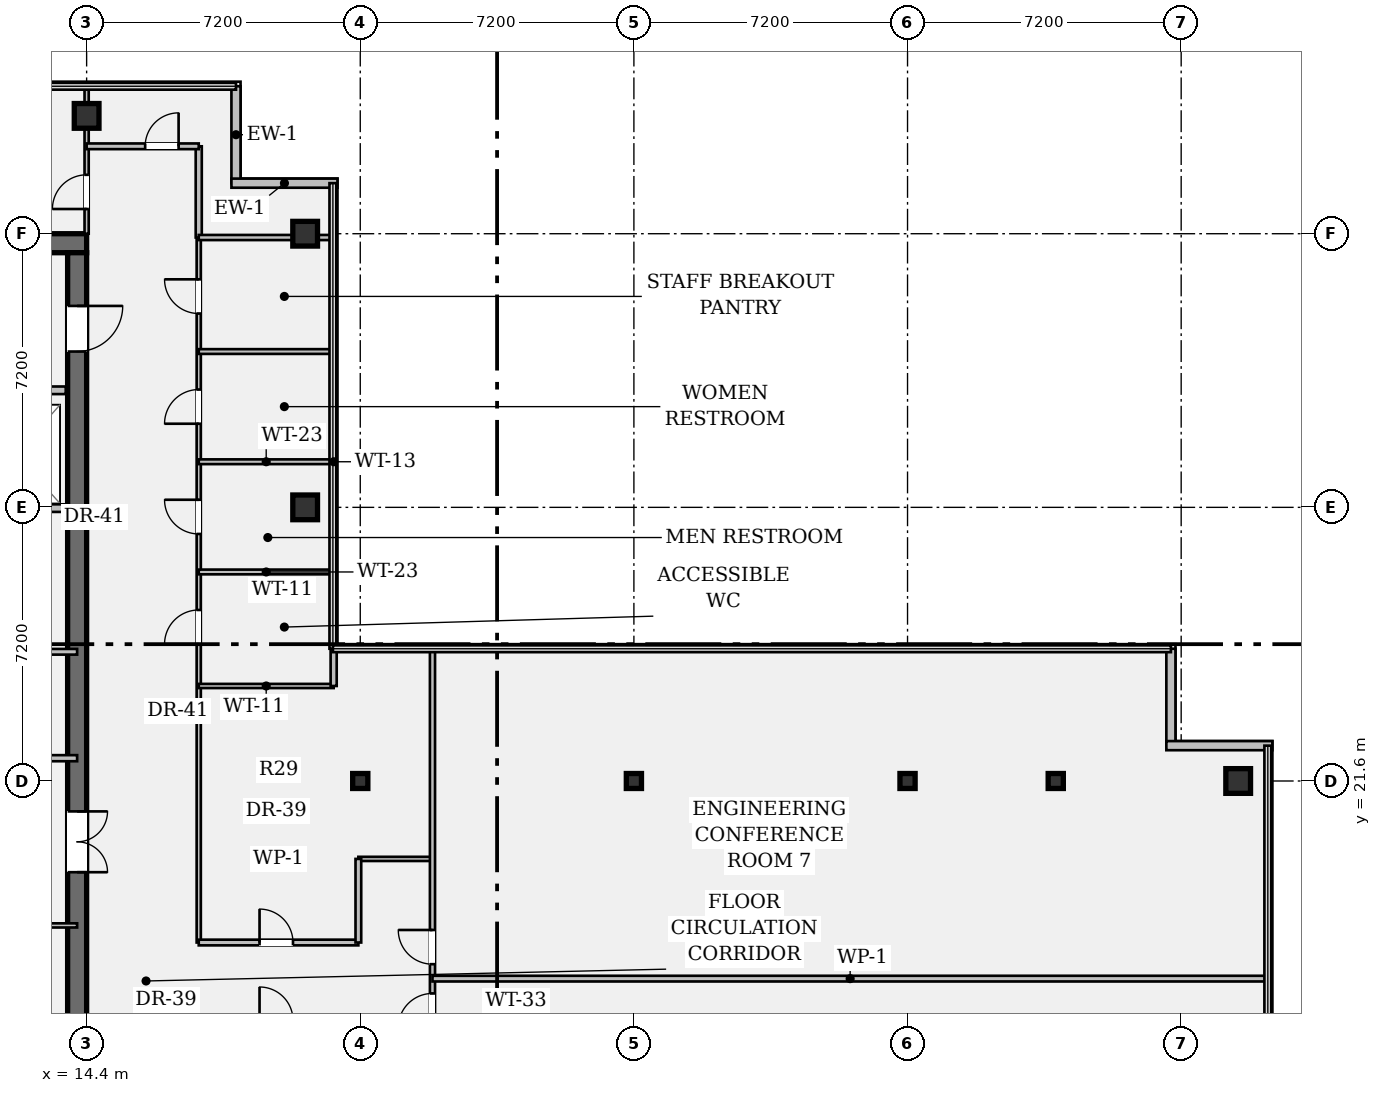
"""IFC4 building model, lengths in metres.
Left out: names, types, materials, properties, quantities, classifications, styles, units other than length and angle.
Written with IfcOpenShell. Run it as: python <this file> out.ifc"""

import sys

from ifc_helpers import new_model, si_unit, direction, frame, frame_2d, origin, origin_2d, place, context, subcontext, project, spatial, rectangle, hollow_rectangle, i_section, extrude, element, fill, save


model = new_model("IFC4")
c1 = context("Model", 3, precision=1e-05, world=origin(), true_north=direction((0.0, 1.0)))
c2 = subcontext(c1, "Body", "Model", "MODEL_VIEW")
j1 = project(units=[si_unit("LENGTHUNIT", "METRE"), si_unit("PLANEANGLEUNIT", "RADIAN")], contexts=[c1])
p1 = place(None, origin())
s1 = spatial("IfcSite", under=j1, at=p1, CompositionType="ELEMENT")
p2 = place(p1, origin())
s2 = spatial("IfcBuilding", under=s1, at=p2, CompositionType="ELEMENT")
p3 = place(p2, frame((0.0, 0.0, 255.15)))
s3 = spatial("IfcBuildingStorey", under=s2, at=p3, CompositionType="ELEMENT", Elevation=255.15)
p4 = place(p3, frame((0.5, 35.75, 0.0), z_axis=(0.0, 0.0, 1.0), x_axis=(1.0, 0.0, 0.0)))
e1 = element("IfcWall", 1, at=p4, inside=s3, PredefinedType="SHEAR", context=c2, shape_type="SweptSolid", body=[
    extrude(rectangle(XDim=13.9, YDim=0.5, at=frame_2d((6.95, 0.0))), origin(), (0.0, 0.0, 1.0), 3.24),
])
p5 = place(p3, frame((14.15, 35.5, 0.0), z_axis=(0.0, 0.0, 1.0), x_axis=(0.0, -1.0, 0.0)))
e2 = element("IfcWall", 2, at=p5, inside=s3, PredefinedType="SHEAR", context=c2, shape_type="SweptSolid", body=[
    extrude(rectangle(XDim=27.8, YDim=0.5, at=frame_2d((13.9, 0.0))), origin(), (0.0, 0.0, 1.0), 3.24),
])
p6 = place(p5, frame((1.4, 0.0, 0.0)))
e3 = element("IfcOpeningElement", 3, at=p6, cuts=e2, PredefinedType="OPENING", context=c2, shape_type="SweptSolid", body=[
    extrude(rectangle(XDim=1.2, YDim=2.15, at=frame_2d((0.6, 1.075))), frame((0.0, 0.262, 0.0), z_axis=(0.0, -1.0, 0.0), x_axis=(1.0, 0.0, 0.0)), (0.0, 0.0, 1.0), 0.524),
])
p7 = place(p5, frame((25.35, 0.0, 0.0)))
e4 = element("IfcOpeningElement", 4, at=p7, cuts=e2, PredefinedType="OPENING", context=c2, shape_type="SweptSolid", body=[
    extrude(rectangle(XDim=1.2, YDim=2.15, at=frame_2d((0.6, 1.075))), frame((0.0, 0.262, 0.0), z_axis=(0.0, -1.0, 0.0), x_axis=(1.0, 0.0, 0.0)), (0.0, 0.0, 1.0), 0.524),
])
p8 = place(p5, frame((14.7, 0.0, 0.0)))
e5 = element("IfcOpeningElement", 5, at=p8, cuts=e2, PredefinedType="OPENING", context=c2, shape_type="SweptSolid", body=[
    extrude(rectangle(XDim=1.6, YDim=2.2, at=frame_2d((0.8, 1.1))), frame((0.0, 0.262, 0.0), z_axis=(0.0, -1.0, 0.0), x_axis=(1.0, 0.0, 0.0)), (0.0, 0.0, 1.0), 0.524),
])
for number, where, z_axis, x_axis in (
    (6, (14.4, 39.1, 0.0), (0.0, 0.0, 1.0), (1.0, 0.0, 0.0)),
    (7, (20.15, 28.8, 0.0), (0.0, 0.0, 1.0), (1.0, 0.0, 0.0)),
    (8, (20.15, 36.0, 0.0), (0.0, 0.0, 1.0), (1.0, 0.0, 0.0)),
):
    element("IfcColumn", number, at=place(p3, frame(where, z_axis=z_axis, x_axis=x_axis)), inside=s3, PredefinedType="COLUMN", context=c2, shape_type="SweptSolid", body=[
        extrude(hollow_rectangle(XDim=0.65, YDim=0.65, WallThickness=0.04, at=origin_2d()), origin(), (0.0, 0.0, 1.0), 3.24),
    ])
for number, where, z_axis, x_axis in (
    (9, (21.6, 21.6, 0.0), (0.0, 0.0, 1.0), (1.0, 0.0, 0.0)),
    (10, (28.8, 21.6, 0.0), (0.0, 0.0, 1.0), (1.0, 0.0, 0.0)),
    (11, (36.0, 21.6, 0.0), (0.0, 0.0, 1.0), (1.0, 0.0, 0.0)),
    (12, (39.9, 21.6, 0.0), (0.0, 0.0, 1.0), (1.0, 0.0, 0.0)),
):
    element("IfcColumn", number, at=place(p3, frame(where, z_axis=z_axis, x_axis=x_axis)), inside=s3, PredefinedType="COLUMN", context=c2, shape_type="SweptSolid", body=[
        extrude(i_section(OverallWidth=0.399, OverallDepth=0.394, WebThickness=0.023, FlangeThickness=0.037, FilletRadius=0.018, at=origin_2d()), origin(), (0.0, 0.0, 1.0), 3.24),
    ])
p9 = place(p3, frame((44.7, 21.6, 0.0), z_axis=(0.0, 0.0, 1.0), x_axis=(1.0, 0.0, 0.0)))
e13 = element("IfcColumn", 13, at=p9, inside=s3, PredefinedType="COLUMN", context=c2, shape_type="SweptSolid", body=[
    extrude(hollow_rectangle(XDim=0.65, YDim=0.65, WallThickness=0.04, at=origin_2d()), origin(), (0.0, 0.0, 1.0), 3.24),
])
p10 = place(p3, frame((18.33, 39.88, 0.0), z_axis=(0.0, 0.0, 1.0), x_axis=(0.0, -1.0, 0.0)))
e14 = element("IfcWall", 14, at=p10, inside=s3, PredefinedType="STANDARD", context=c2, shape_type="SweptSolid", body=[
    extrude(rectangle(XDim=2.55, YDim=0.24, at=frame_2d((1.275, 0.0))), origin(), (0.0, 0.0, 1.0), 3.24),
])
p11 = place(p3, frame((18.21, 37.33, 0.0), z_axis=(0.0, 0.0, 1.0), x_axis=(1.0, 0.0, 0.0)))
e15 = element("IfcWall", 15, at=p11, inside=s3, PredefinedType="STANDARD", context=c2, shape_type="SweptSolid", body=[
    extrude(rectangle(XDim=2.79, YDim=0.24, at=frame_2d((1.395, 0.0))), origin(), (0.0, 0.0, 1.0), 3.24),
])
p12 = place(p3, frame((42.93, 25.08, 0.0), z_axis=(0.0, 0.0, 1.0), x_axis=(0.0, -1.0, 0.0)))
e16 = element("IfcWall", 16, at=p12, inside=s3, PredefinedType="STANDARD", context=c2, shape_type="SweptSolid", body=[
    extrude(rectangle(XDim=2.55, YDim=0.24, at=frame_2d((1.275, 0.0))), origin(), (0.0, 0.0, 1.0), 3.24),
])
p13 = place(p3, frame((42.81, 22.53, 0.0), z_axis=(0.0, 0.0, 1.0), x_axis=(1.0, 0.0, 0.0)))
e17 = element("IfcWall", 17, at=p13, inside=s3, PredefinedType="STANDARD", context=c2, shape_type="SweptSolid", body=[
    extrude(rectangle(XDim=2.79, YDim=0.24, at=frame_2d((1.395, 0.0))), origin(), (0.0, 0.0, 1.0), 3.24),
])
p14 = place(p3, frame((8.7, 31.88, 0.0), z_axis=(0.0, 0.0, 1.0), x_axis=(1.0, 0.0, 0.0)))
e18 = element("IfcWall", 18, at=p14, inside=s3, PredefinedType="PARTITIONING", context=c2, shape_type="SweptSolid", body=[
    extrude(rectangle(XDim=5.15, YDim=0.2, at=frame_2d((2.575, 0.0))), origin(), (0.0, 0.0, 1.0), 3.24),
])
p15 = place(p14, frame((0.75, 0.0, 0.0)))
e19 = element("IfcOpeningElement", 19, at=p15, cuts=e18, PredefinedType="OPENING", context=c2, shape_type="SweptSolid", body=[
    extrude(rectangle(XDim=1.2, YDim=2.2, at=frame_2d((0.6, 1.1))), frame((0.0, 0.112, 0.0), z_axis=(0.0, -1.0, 0.0), x_axis=(1.0, 0.0, 0.0)), (0.0, 0.0, 1.0), 0.224),
])
p16 = place(p14, frame((3.25, 0.0, 0.0)))
e20 = element("IfcOpeningElement", 20, at=p16, cuts=e18, PredefinedType="OPENING", context=c2, shape_type="SweptSolid", body=[
    extrude(rectangle(XDim=1.2, YDim=2.2, at=frame_2d((0.6, 1.1))), frame((0.0, 0.112, 0.0), z_axis=(0.0, -1.0, 0.0), x_axis=(1.0, 0.0, 0.0)), (0.0, 0.0, 1.0), 0.224),
])
p17 = place(p3, frame((8.7, 28.78, 0.0), z_axis=(0.0, 0.0, 1.0), x_axis=(1.0, 0.0, 0.0)))
e21 = element("IfcWall", 21, at=p17, inside=s3, PredefinedType="PARTITIONING", context=c2, shape_type="SweptSolid", body=[
    extrude(rectangle(XDim=5.15, YDim=0.2, at=frame_2d((2.575, 0.0))), origin(), (0.0, 0.0, 1.0), 3.24),
])
p18 = place(p3, frame((7.1, 22.2, 0.0), z_axis=(0.0, 0.0, 1.0), x_axis=(1.0, 0.0, 0.0)))
e22 = element("IfcWall", 22, at=p18, inside=s3, PredefinedType="PARTITIONING", context=c2, shape_type="SweptSolid", body=[
    extrude(rectangle(XDim=7.05, YDim=0.16, at=frame_2d((3.525, 0.0))), origin(), (0.0, 0.0, 1.0), 3.24),
])
p19 = place(p18, frame((2.4, 0.0, 0.0)))
e23 = element("IfcOpeningElement", 23, at=p19, cuts=e22, PredefinedType="OPENING", context=c2, shape_type="SweptSolid", body=[
    extrude(rectangle(XDim=0.88, YDim=2.15, at=frame_2d((0.44, 1.075))), frame((0.0, 0.092, 0.0), z_axis=(0.0, -1.0, 0.0), x_axis=(1.0, 0.0, 0.0)), (0.0, 0.0, 1.0), 0.184),
])
p20 = place(p3, frame((7.1, 25.0, 0.0), z_axis=(0.0, 0.0, 1.0), x_axis=(1.0, 0.0, 0.0)))
e24 = element("IfcWall", 24, at=p20, inside=s3, PredefinedType="PARTITIONING", context=c2, shape_type="SweptSolid", body=[
    extrude(rectangle(XDim=7.05, YDim=0.15, at=frame_2d((3.525, 0.0))), origin(), (0.0, 0.0, 1.0), 3.24),
])
p21 = place(p3, frame((5.15, 17.8, 0.0), z_axis=(0.0, 0.0, 1.0), x_axis=(1.0, 0.0, 0.0)))
e25 = element("IfcWall", 25, at=p21, inside=s3, PredefinedType="PARTITIONING", context=c2, shape_type="SweptSolid", body=[
    extrude(rectangle(XDim=9.0, YDim=0.11, at=frame_2d((4.5, 0.0))), origin(), (0.0, 0.0, 1.0), 3.24),
])
p22 = place(p21, frame((2.65, 0.0, 0.0)))
e26 = element("IfcOpeningElement", 26, at=p22, cuts=e25, PredefinedType="OPENING", context=c2, shape_type="SweptSolid", body=[
    extrude(rectangle(XDim=0.9, YDim=2.15, at=frame_2d((0.45, 1.075))), frame((0.0, 0.067, 0.0), z_axis=(0.0, -1.0, 0.0), x_axis=(1.0, 0.0, 0.0)), (0.0, 0.0, 1.0), 0.134),
])
p23 = place(p21, frame((6.15, 0.0, 0.0)))
e27 = element("IfcOpeningElement", 27, at=p23, cuts=e25, PredefinedType="OPENING", context=c2, shape_type="SweptSolid", body=[
    extrude(rectangle(XDim=0.88, YDim=2.15, at=frame_2d((0.44, 1.075))), frame((0.0, 0.067, 0.0), z_axis=(0.0, -1.0, 0.0), x_axis=(1.0, 0.0, 0.0)), (0.0, 0.0, 1.0), 0.134),
])
p24 = place(p3, frame((17.35, 17.35, 0.0), z_axis=(0.0, 0.0, 1.0), x_axis=(0.0, 1.0, 0.0)))
e28 = element("IfcWall", 28, at=p24, inside=s3, PredefinedType="PARTITIONING", context=c2, shape_type="SweptSolid", body=[
    extrude(rectangle(XDim=18.55, YDim=0.11, at=frame_2d((9.275, 0.0))), origin(), (0.0, 0.0, 1.0), 2.676),
])
p25 = place(p24, frame((7.85, 0.0, 0.0)))
e29 = element("IfcOpeningElement", 29, at=p25, cuts=e28, PredefinedType="OPENING", context=c2, shape_type="SweptSolid", body=[
    extrude(rectangle(XDim=0.9, YDim=2.15, at=frame_2d((0.45, 1.075))), frame((0.0, 0.067, 0.0), z_axis=(0.0, -1.0, 0.0), x_axis=(1.0, 0.0, 0.0)), (0.0, 0.0, 1.0), 0.134),
])
p26 = place(p24, frame((10.75, 0.0, 0.0)))
e30 = element("IfcOpeningElement", 30, at=p26, cuts=e28, PredefinedType="OPENING", context=c2, shape_type="SweptSolid", body=[
    extrude(rectangle(XDim=0.9, YDim=2.15, at=frame_2d((0.45, 1.075))), frame((0.0, 0.067, 0.0), z_axis=(0.0, -1.0, 0.0), x_axis=(1.0, 0.0, 0.0)), (0.0, 0.0, 1.0), 0.134),
])
p27 = place(p24, frame((13.65, 0.0, 0.0)))
e31 = element("IfcOpeningElement", 31, at=p27, cuts=e28, PredefinedType="OPENING", context=c2, shape_type="SweptSolid", body=[
    extrude(rectangle(XDim=0.9, YDim=2.15, at=frame_2d((0.45, 1.075))), frame((0.0, 0.067, 0.0), z_axis=(0.0, -1.0, 0.0), x_axis=(1.0, 0.0, 0.0)), (0.0, 0.0, 1.0), 0.134),
])
p28 = place(p24, frame((16.55, 0.0, 0.0)))
e32 = element("IfcOpeningElement", 32, at=p28, cuts=e28, PredefinedType="OPENING", context=c2, shape_type="SweptSolid", body=[
    extrude(rectangle(XDim=0.9, YDim=2.15, at=frame_2d((0.45, 1.075))), frame((0.0, 0.067, 0.0), z_axis=(0.0, -1.0, 0.0), x_axis=(1.0, 0.0, 0.0)), (0.0, 0.0, 1.0), 0.134),
])
p29 = place(p3, frame((17.35, 17.35, 0.0), z_axis=(0.0, 0.0, 1.0), x_axis=(1.0, 0.0, 0.0)))
e33 = element("IfcWall", 33, at=p29, inside=s3, PredefinedType="PARTITIONING", context=c2, shape_type="SweptSolid", body=[
    extrude(rectangle(XDim=4.2, YDim=0.15, at=frame_2d((2.1, 0.0))), origin(), (0.0, 0.0, 1.0), 2.808),
])
p30 = place(p29, frame((1.6, 0.0, 0.0)))
e34 = element("IfcOpeningElement", 34, at=p30, cuts=e33, PredefinedType="OPENING", context=c2, shape_type="SweptSolid", body=[
    extrude(rectangle(XDim=0.88, YDim=2.15, at=frame_2d((0.44, 1.075))), frame((0.0, 0.087, 0.0), z_axis=(0.0, -1.0, 0.0), x_axis=(1.0, 0.0, 0.0)), (0.0, 0.0, 1.0), 0.174),
])
p31 = place(p3, frame((21.55, 19.55, 0.0), z_axis=(0.0, 0.0, 1.0), x_axis=(1.0, 0.0, 0.0)))
e35 = element("IfcWall", 35, at=p31, inside=s3, PredefinedType="PARTITIONING", context=c2, shape_type="SweptSolid", body=[
    extrude(rectangle(XDim=1.95, YDim=0.11, at=frame_2d((0.975, 0.0))), origin(), (0.0, 0.0, 1.0), 3.24),
])
p32 = place(p3, frame((21.55, 17.35, 0.0), z_axis=(0.0, 0.0, 1.0), x_axis=(0.0, 1.0, 0.0)))
e36 = element("IfcWall", 36, at=p32, inside=s3, PredefinedType="PARTITIONING", context=c2, shape_type="SweptSolid", body=[
    extrude(rectangle(XDim=2.2, YDim=0.15, at=frame_2d((1.1, 0.0))), origin(), (0.0, 0.0, 1.0), 2.676),
])
p33 = place(p3, frame((23.5, 6.52, 0.0), z_axis=(0.0, 0.0, 1.0), x_axis=(0.0, 1.0, 0.0)))
e37 = element("IfcWall", 37, at=p33, inside=s3, PredefinedType="PARTITIONING", context=c2, shape_type="SweptSolid", body=[
    extrude(rectangle(XDim=18.56, YDim=0.135, at=frame_2d((9.28, 0.0))), origin(), (0.0, 0.0, 1.0), 2.676),
])
p34 = place(p33, frame((8.59, 0.0, 0.0)))
e38 = element("IfcOpeningElement", 38, at=p34, cuts=e37, PredefinedType="OPENING", context=c2, shape_type="SweptSolid", body=[
    extrude(rectangle(XDim=0.9, YDim=2.15, at=frame_2d((0.45, 1.075))), frame((0.0, 0.08, 0.0), z_axis=(0.0, -1.0, 0.0), x_axis=(1.0, 0.0, 0.0)), (0.0, 0.0, 1.0), 0.159),
])
p35 = place(p33, frame((10.26, 0.0, 0.0)))
e39 = element("IfcOpeningElement", 39, at=p35, cuts=e37, PredefinedType="OPENING", context=c2, shape_type="SweptSolid", body=[
    extrude(rectangle(XDim=0.9, YDim=2.15, at=frame_2d((0.45, 1.075))), frame((0.0, 0.08, 0.0), z_axis=(0.0, -1.0, 0.0), x_axis=(1.0, 0.0, 0.0)), (0.0, 0.0, 1.0), 0.159),
])
p36 = place(p3, frame((14.4, 36.0, 0.0), z_axis=(0.0, 0.0, 1.0), x_axis=(0.0, 1.0, 0.0)))
e40 = element("IfcWall", 40, at=p36, inside=s3, PredefinedType="PARTITIONING", context=c2, shape_type="SweptSolid", body=[
    extrude(rectangle(XDim=3.88, YDim=0.11, at=frame_2d((1.94, 0.0))), origin(), (0.0, 0.0, 1.0), 2.676),
])
p37 = place(p36, frame((0.65, 0.0, 0.0)))
e41 = element("IfcOpeningElement", 41, at=p37, cuts=e40, PredefinedType="OPENING", context=c2, shape_type="SweptSolid", body=[
    extrude(rectangle(XDim=0.9, YDim=2.15, at=frame_2d((0.45, 1.075))), frame((0.0, 0.067, 0.0), z_axis=(0.0, -1.0, 0.0), x_axis=(1.0, 0.0, 0.0)), (0.0, 0.0, 1.0), 0.134),
])
p38 = place(p3, frame((17.35, 35.9, 0.0), z_axis=(0.0, 0.0, 1.0), x_axis=(0.0, 1.0, 0.0)))
e42 = element("IfcWall", 42, at=p38, inside=s3, PredefinedType="PARTITIONING", context=c2, shape_type="SweptSolid", body=[
    extrude(rectangle(XDim=2.4, YDim=0.16, at=frame_2d((1.2, 0.0))), origin(), (0.0, 0.0, 1.0), 2.676),
])
p39 = place(p3, frame((14.4, 38.3, 0.0), z_axis=(0.0, 0.0, 1.0), x_axis=(1.0, 0.0, 0.0)))
e43 = element("IfcWall", 43, at=p39, inside=s3, PredefinedType="PARTITIONING", context=c2, shape_type="SweptSolid", body=[
    extrude(rectangle(XDim=2.95, YDim=0.15, at=frame_2d((1.475, 0.0))), origin(), (0.0, 0.0, 1.0), 3.24),
])
p40 = place(p39, frame((1.54, 0.0, 0.0)))
e44 = element("IfcOpeningElement", 44, at=p40, cuts=e43, PredefinedType="OPENING", context=c2, shape_type="SweptSolid", body=[
    extrude(rectangle(XDim=0.88, YDim=2.15, at=frame_2d((0.44, 1.075))), frame((0.0, 0.087, 0.0), z_axis=(0.0, -1.0, 0.0), x_axis=(1.0, 0.0, 0.0)), (0.0, 0.0, 1.0), 0.174),
])
p41 = place(p3, frame((17.35, 35.9, 0.0), z_axis=(0.0, 0.0, 1.0), x_axis=(1.0, 0.0, 0.0)))
e45 = element("IfcWall", 45, at=p41, inside=s3, PredefinedType="PARTITIONING", context=c2, shape_type="SweptSolid", body=[
    extrude(rectangle(XDim=3.53, YDim=0.135, at=frame_2d((1.765, 0.0))), origin(), (0.0, 0.0, 1.0), 2.676),
])
p42 = place(p3, frame((17.35, 24.1, 0.0), z_axis=(0.0, 0.0, 1.0), x_axis=(1.0, 0.0, 0.0)))
e46 = element("IfcWall", 46, at=p42, inside=s3, PredefinedType="PARTITIONING", context=c2, shape_type="SweptSolid", body=[
    extrude(rectangle(XDim=3.55, YDim=0.11, at=frame_2d((1.775, 0.0))), origin(), (0.0, 0.0, 1.0), 2.808),
])
p43 = place(p3, frame((20.9, 24.1, 0.0), z_axis=(0.0, 0.0, 1.0), x_axis=(0.0, 1.0, 0.0)))
e47 = element("IfcWall", 47, at=p43, inside=s3, PredefinedType="PARTITIONING", context=c2, shape_type="SweptSolid", body=[
    extrude(rectangle(XDim=11.8, YDim=0.16, at=frame_2d((5.9, 0.0))), origin(), (0.0, 0.0, 1.0), 3.24),
])
for number, where, z_axis, x_axis in (
    (48, (17.35, 27.1, 0.0), (0.0, 0.0, 1.0), (1.0, 0.0, 0.0)),
    (49, (17.35, 30.0, 0.0), (0.0, 0.0, 1.0), (1.0, 0.0, 0.0)),
    (50, (17.35, 32.9, 0.0), (0.0, 0.0, 1.0), (1.0, 0.0, 0.0)),
):
    element("IfcWall", number, at=place(p3, frame(where, z_axis=z_axis, x_axis=x_axis)), inside=s3, PredefinedType="PARTITIONING", context=c2, shape_type="SweptSolid", body=[
        extrude(rectangle(XDim=3.55, YDim=0.125, at=frame_2d((1.775, 0.0))), origin(), (0.0, 0.0, 1.0), 2.808),
    ])
p44 = place(p3, frame((23.5, 16.4, 0.0), z_axis=(0.0, 0.0, 1.0), x_axis=(1.0, 0.0, 0.0)))
e51 = element("IfcWall", 51, at=p44, inside=s3, PredefinedType="PARTITIONING", context=c2, shape_type="SweptSolid", body=[
    extrude(rectangle(XDim=21.98, YDim=0.15, at=frame_2d((10.99, 0.0))), origin(), (0.0, 0.0, 1.0), 2.676),
])
p45 = place(p6, origin())
e52 = element("IfcDoor", 52, at=p45, inside=s3, OperationType="SINGLE_SWING_LEFT", PredefinedType="DOOR", context=c2, shape_type="SweptSolid", body=[
    extrude(rectangle(XDim=1.2, YDim=2.15, at=frame_2d((0.6, 1.075))), frame((0.0, 0.025, 0.0), z_axis=(0.0, -1.0, 0.0), x_axis=(1.0, 0.0, 0.0)), (0.0, 0.0, 1.0), 0.05),
])
fill(e3, e52)
p46 = place(p8, origin())
e53 = element("IfcDoor", 53, at=p46, inside=s3, OperationType="DOUBLE_DOOR_SINGLE_SWING", PredefinedType="DOOR", context=c2, shape_type="SweptSolid", body=[
    extrude(rectangle(XDim=1.6, YDim=2.2, at=frame_2d((0.8, 1.1))), frame((0.0, 0.025, 0.0), z_axis=(0.0, -1.0, 0.0), x_axis=(1.0, 0.0, 0.0)), (0.0, 0.0, 1.0), 0.05),
])
fill(e5, e53)
p47 = place(p37, origin())
e54 = element("IfcDoor", 54, at=p47, inside=s3, OperationType="SINGLE_SWING_LEFT", PredefinedType="DOOR", context=c2, shape_type="SweptSolid", body=[
    extrude(rectangle(XDim=0.9, YDim=2.15, at=frame_2d((0.45, 1.075))), frame((0.0, 0.025, 0.0), z_axis=(0.0, -1.0, 0.0), x_axis=(1.0, 0.0, 0.0)), (0.0, 0.0, 1.0), 0.05),
])
fill(e41, e54)
p48 = place(p40, origin())
e55 = element("IfcDoor", 55, at=p48, inside=s3, OperationType="SINGLE_SWING_RIGHT", PredefinedType="DOOR", context=c2, shape_type="SweptSolid", body=[
    extrude(rectangle(XDim=0.88, YDim=2.15, at=frame_2d((0.44, 1.075))), frame((0.0, 0.025, 0.0), z_axis=(0.0, -1.0, 0.0), x_axis=(1.0, 0.0, 0.0)), (0.0, 0.0, 1.0), 0.05),
])
fill(e44, e55)
p49 = place(p25, origin())
e56 = element("IfcDoor", 56, at=p49, inside=s3, OperationType="SINGLE_SWING_LEFT", PredefinedType="DOOR", context=c2, shape_type="SweptSolid", body=[
    extrude(rectangle(XDim=0.9, YDim=2.15, at=frame_2d((0.45, 1.075))), frame((0.0, 0.025, 0.0), z_axis=(0.0, -1.0, 0.0), x_axis=(1.0, 0.0, 0.0)), (0.0, 0.0, 1.0), 0.05),
])
fill(e29, e56)
p50 = place(p26, origin())
e57 = element("IfcDoor", 57, at=p50, inside=s3, OperationType="SINGLE_SWING_RIGHT", PredefinedType="DOOR", context=c2, shape_type="SweptSolid", body=[
    extrude(rectangle(XDim=0.9, YDim=2.15, at=frame_2d((0.45, 1.075))), frame((0.0, 0.025, 0.0), z_axis=(0.0, -1.0, 0.0), x_axis=(1.0, 0.0, 0.0)), (0.0, 0.0, 1.0), 0.05),
])
fill(e30, e57)
p51 = place(p27, origin())
e58 = element("IfcDoor", 58, at=p51, inside=s3, OperationType="SINGLE_SWING_LEFT", PredefinedType="DOOR", context=c2, shape_type="SweptSolid", body=[
    extrude(rectangle(XDim=0.9, YDim=2.15, at=frame_2d((0.45, 1.075))), frame((0.0, 0.025, 0.0), z_axis=(0.0, -1.0, 0.0), x_axis=(1.0, 0.0, 0.0)), (0.0, 0.0, 1.0), 0.05),
])
fill(e31, e58)
p52 = place(p28, origin())
e59 = element("IfcDoor", 59, at=p52, inside=s3, OperationType="SINGLE_SWING_RIGHT", PredefinedType="DOOR", context=c2, shape_type="SweptSolid", body=[
    extrude(rectangle(XDim=0.9, YDim=2.15, at=frame_2d((0.45, 1.075))), frame((0.0, 0.025, 0.0), z_axis=(0.0, -1.0, 0.0), x_axis=(1.0, 0.0, 0.0)), (0.0, 0.0, 1.0), 0.05),
])
fill(e32, e59)
p53 = place(p30, origin())
e60 = element("IfcDoor", 60, at=p53, inside=s3, OperationType="SINGLE_SWING_LEFT", PredefinedType="DOOR", context=c2, shape_type="SweptSolid", body=[
    extrude(rectangle(XDim=0.88, YDim=2.15, at=frame_2d((0.44, 1.075))), frame((0.0, 0.025, 0.0), z_axis=(0.0, -1.0, 0.0), x_axis=(1.0, 0.0, 0.0)), (0.0, 0.0, 1.0), 0.05),
])
fill(e34, e60)
p54 = place(p34, origin())
e61 = element("IfcDoor", 61, at=p54, inside=s3, OperationType="SINGLE_SWING_LEFT", PredefinedType="DOOR", context=c2, shape_type="SweptSolid", body=[
    extrude(rectangle(XDim=0.9, YDim=2.15, at=frame_2d((0.45, 1.075))), frame((0.0, 0.025, 0.0), z_axis=(0.0, -1.0, 0.0), x_axis=(1.0, 0.0, 0.0)), (0.0, 0.0, 1.0), 0.05),
])
fill(e38, e61)
p55 = place(p35, origin())
e62 = element("IfcDoor", 62, at=p55, inside=s3, OperationType="SINGLE_SWING_RIGHT", PredefinedType="DOOR", context=c2, shape_type="SweptSolid", body=[
    extrude(rectangle(XDim=0.9, YDim=2.15, at=frame_2d((0.45, 1.075))), frame((0.0, 0.025, 0.0), z_axis=(0.0, -1.0, 0.0), x_axis=(1.0, 0.0, 0.0)), (0.0, 0.0, 1.0), 0.05),
])
fill(e39, e62)
save(model, sys.argv[1])
